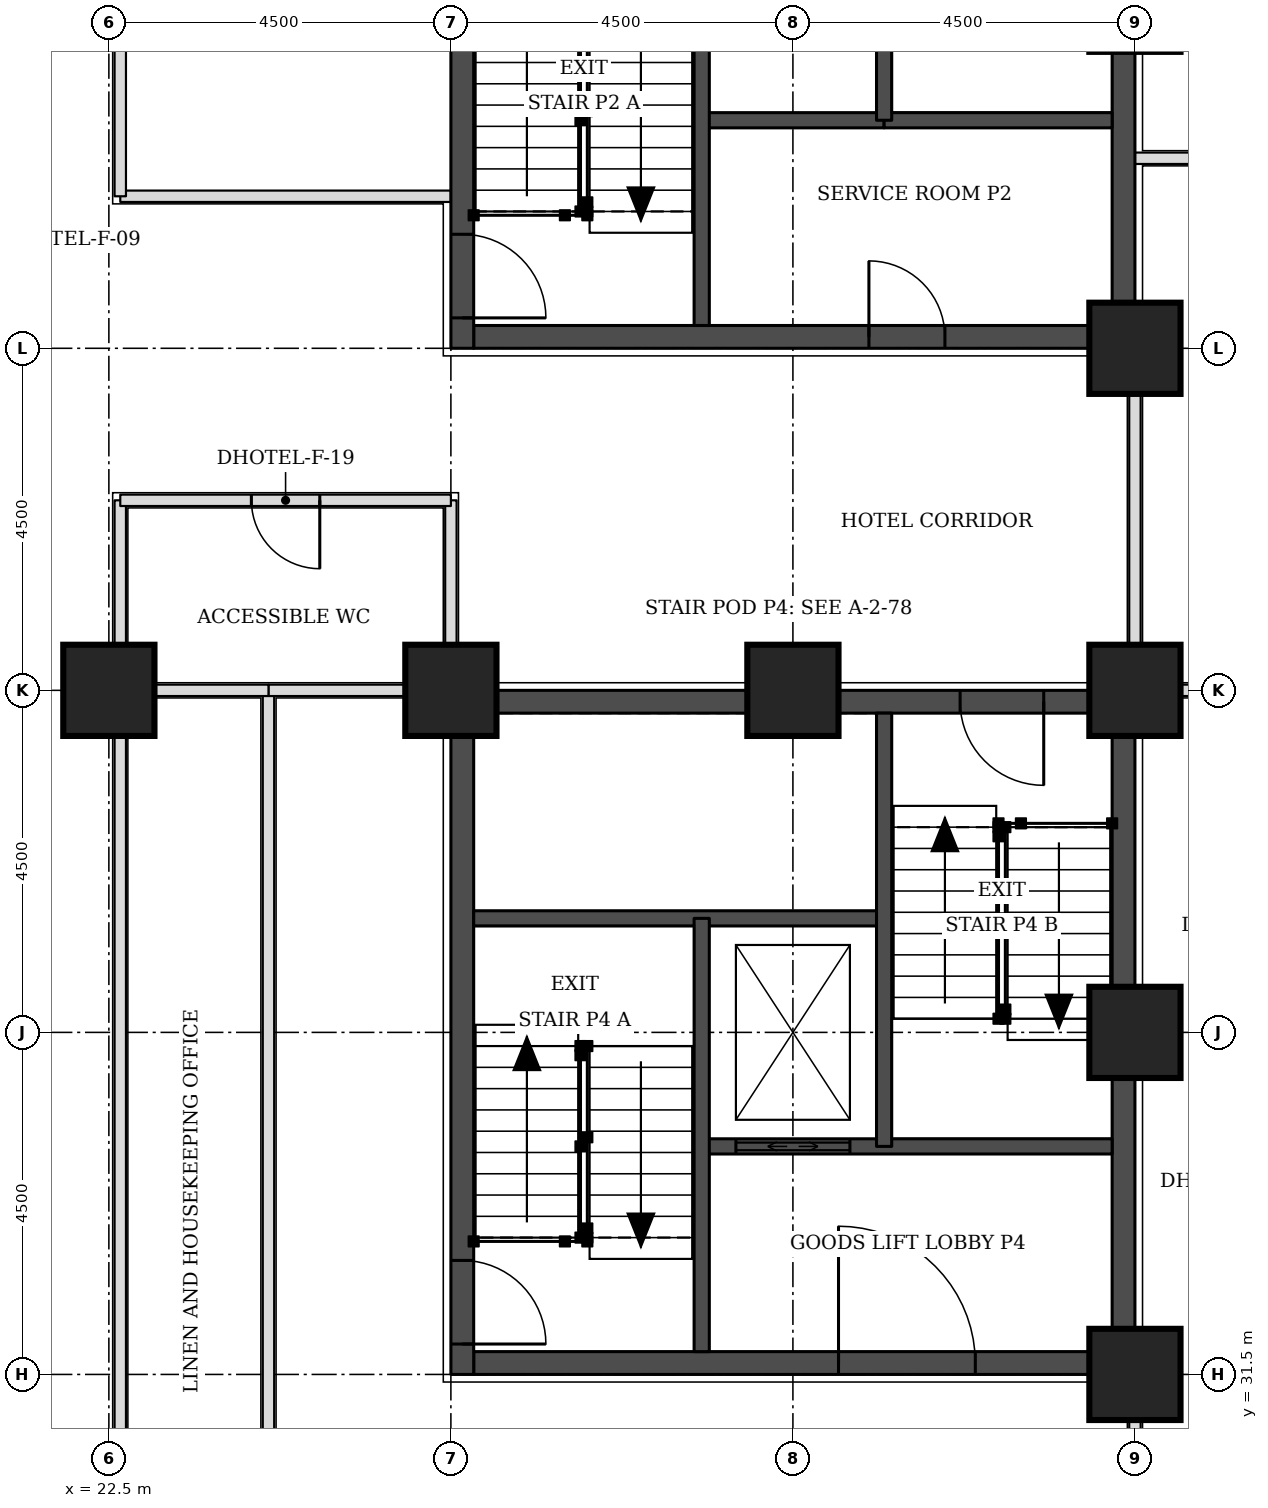
"""IFC4 building model, lengths in metres.
Left out: names, types, materials, properties, quantities, classifications, styles, units other than length and angle.
Written with IfcOpenShell. Run it as: python <this file> out.ifc"""

import sys

from ifc_helpers import new_model, si_unit, direction, frame, frame_2d, origin, origin_2d, place, context, subcontext, project, spatial, rectangle, extrude, element, fill, save


model = new_model("IFC4")
c1 = context("Model", 3, precision=1e-05, world=origin(), true_north=direction((0.0, 1.0)))
c2 = subcontext(c1, "Body", "Model", "MODEL_VIEW")
j1 = project(units=[si_unit("LENGTHUNIT", "METRE"), si_unit("PLANEANGLEUNIT", "RADIAN")], contexts=[c1])
p1 = place(None, origin())
s1 = spatial("IfcSite", under=j1, at=p1, CompositionType="ELEMENT")
p2 = place(p1, origin())
s2 = spatial("IfcBuilding", under=s1, at=p2, CompositionType="ELEMENT")
p3 = place(p2, frame((0.0, 0.0, 42.9)))
s3 = spatial("IfcBuildingStorey", under=s2, at=p3, CompositionType="ELEMENT", Elevation=42.9)
for number, where, z_axis, x_axis in (
    (1, (36.0, 31.5, 0.0), (0.0, 0.0, 1.0), (1.0, 0.0, 0.0)),
    (2, (36.0, 36.0, 0.0), (0.0, 0.0, 1.0), (1.0, 0.0, 0.0)),
    (3, (22.5, 40.5, 0.0), (0.0, 0.0, 1.0), (1.0, 0.0, 0.0)),
    (4, (27.0, 40.5, 0.0), (0.0, 0.0, 1.0), (1.0, 0.0, 0.0)),
    (5, (31.5, 40.5, 0.0), (0.0, 0.0, 1.0), (1.0, 0.0, 0.0)),
    (6, (36.0, 40.5, 0.0), (0.0, 0.0, 1.0), (1.0, 0.0, 0.0)),
    (7, (36.0, 45.0, 0.0), (0.0, 0.0, 1.0), (1.0, 0.0, 0.0)),
):
    element("IfcColumn", number, at=place(p3, frame(where, z_axis=z_axis, x_axis=x_axis)), inside=s3, PredefinedType="COLUMN", context=c2, shape_type="SweptSolid", body=[
        extrude(rectangle(XDim=1.2, YDim=1.2, at=origin_2d()), origin(), (0.0, 0.0, 1.0), 3.3),
    ])
p4 = place(p3, frame((27.3, 45.15, 0.0), z_axis=(0.0, 0.0, 1.0), x_axis=(1.0, 0.0, 0.0)))
e8 = element("IfcWall", 8, at=p4, inside=s3, PredefinedType="SHEAR", context=c2, shape_type="SweptSolid", body=[
    extrude(rectangle(XDim=8.4, YDim=0.3, at=frame_2d((4.2, 0.0))), origin(), (0.0, 0.0, 1.0), 3.3),
])
p5 = place(p4, frame((5.2, 0.0, 0.0)))
e9 = element("IfcOpeningElement", 9, at=p5, cuts=e8, PredefinedType="OPENING", context=c2, shape_type="SweptSolid", body=[
    extrude(rectangle(XDim=1.0, YDim=2.1, at=frame_2d((0.5, 1.05))), frame((0.0, 0.16, 0.0), z_axis=(0.0, -1.0, 0.0), x_axis=(1.0, 0.0, 0.0)), (0.0, 0.0, 1.0), 0.32),
])
p6 = place(p3, frame((27.15, 45.0, 0.0), z_axis=(0.0, 0.0, 1.0), x_axis=(0.0, 1.0, 0.0)))
e10 = element("IfcWall", 10, at=p6, inside=s3, PredefinedType="SHEAR", context=c2, shape_type="SweptSolid", body=[
    extrude(rectangle(XDim=9.0, YDim=0.3, at=frame_2d((4.5, 0.0))), origin(), (0.0, 0.0, 1.0), 3.3),
])
p7 = place(p6, frame((0.4, 0.0, 0.0)))
e11 = element("IfcOpeningElement", 11, at=p7, cuts=e10, PredefinedType="OPENING", context=c2, shape_type="SweptSolid", body=[
    extrude(rectangle(XDim=1.1, YDim=2.1, at=frame_2d((0.55, 1.05))), frame((0.0, 0.16, 0.0), z_axis=(0.0, -1.0, 0.0), x_axis=(1.0, 0.0, 0.0)), (0.0, 0.0, 1.0), 0.32),
])
p8 = place(p3, frame((35.85, 45.0, 0.0), z_axis=(0.0, 0.0, 1.0), x_axis=(0.0, 1.0, 0.0)))
e12 = element("IfcWall", 12, at=p8, inside=s3, PredefinedType="SHEAR", context=c2, shape_type="SweptSolid", body=[
    extrude(rectangle(XDim=9.0, YDim=0.3, at=frame_2d((4.5, 0.0))), origin(), (0.0, 0.0, 1.0), 3.3),
])
p9 = place(p3, frame((27.3, 31.65, 0.0), z_axis=(0.0, 0.0, 1.0), x_axis=(1.0, 0.0, 0.0)))
e13 = element("IfcWall", 13, at=p9, inside=s3, PredefinedType="SHEAR", context=c2, shape_type="SweptSolid", body=[
    extrude(rectangle(XDim=8.4, YDim=0.3, at=frame_2d((4.2, 0.0))), origin(), (0.0, 0.0, 1.0), 3.3),
])
p10 = place(p9, frame((4.8, 0.0, 0.0)))
e14 = element("IfcOpeningElement", 14, at=p10, cuts=e13, PredefinedType="OPENING", context=c2, shape_type="SweptSolid", body=[
    extrude(rectangle(XDim=1.8, YDim=2.1, at=frame_2d((0.9, 1.05))), frame((0.0, 0.16, 0.0), z_axis=(0.0, -1.0, 0.0), x_axis=(1.0, 0.0, 0.0)), (0.0, 0.0, 1.0), 0.32),
])
p11 = place(p3, frame((27.3, 40.35, 0.0), z_axis=(0.0, 0.0, 1.0), x_axis=(1.0, 0.0, 0.0)))
e15 = element("IfcWall", 15, at=p11, inside=s3, PredefinedType="SHEAR", context=c2, shape_type="SweptSolid", body=[
    extrude(rectangle(XDim=8.4, YDim=0.3, at=frame_2d((4.2, 0.0))), origin(), (0.0, 0.0, 1.0), 3.3),
])
p12 = place(p11, frame((6.4, 0.0, 0.0)))
e16 = element("IfcOpeningElement", 16, at=p12, cuts=e15, PredefinedType="OPENING", context=c2, shape_type="SweptSolid", body=[
    extrude(rectangle(XDim=1.1, YDim=2.1, at=frame_2d((0.55, 1.05))), frame((0.0, 0.16, 0.0), z_axis=(0.0, -1.0, 0.0), x_axis=(1.0, 0.0, 0.0)), (0.0, 0.0, 1.0), 0.32),
])
p13 = place(p3, frame((27.15, 31.5, 0.0), z_axis=(0.0, 0.0, 1.0), x_axis=(0.0, 1.0, 0.0)))
e17 = element("IfcWall", 17, at=p13, inside=s3, PredefinedType="SHEAR", context=c2, shape_type="SweptSolid", body=[
    extrude(rectangle(XDim=9.0, YDim=0.3, at=frame_2d((4.5, 0.0))), origin(), (0.0, 0.0, 1.0), 3.3),
])
p14 = place(p13, frame((0.4, 0.0, 0.0)))
e18 = element("IfcOpeningElement", 18, at=p14, cuts=e17, PredefinedType="OPENING", context=c2, shape_type="SweptSolid", body=[
    extrude(rectangle(XDim=1.1, YDim=2.1, at=frame_2d((0.55, 1.05))), frame((0.0, 0.16, 0.0), z_axis=(0.0, -1.0, 0.0), x_axis=(1.0, 0.0, 0.0)), (0.0, 0.0, 1.0), 0.32),
])
p15 = place(p3, frame((35.85, 31.5, 0.0), z_axis=(0.0, 0.0, 1.0), x_axis=(0.0, 1.0, 0.0)))
e19 = element("IfcWall", 19, at=p15, inside=s3, PredefinedType="SHEAR", context=c2, shape_type="SweptSolid", body=[
    extrude(rectangle(XDim=9.0, YDim=0.3, at=frame_2d((4.5, 0.0))), origin(), (0.0, 0.0, 1.0), 3.3),
])
p16 = place(p3, frame((22.65, 25.65, 0.0), z_axis=(0.0, 0.0, 1.0), x_axis=(0.0, 1.0, 0.0)))
e20 = element("IfcWall", 20, at=p16, inside=s3, PredefinedType="PARTITIONING", context=c2, shape_type="SweptSolid", body=[
    extrude(rectangle(XDim=17.35, YDim=0.15, at=frame_2d((8.675, 0.0))), origin(), (0.0, 0.0, 1.0), 3.08),
])
p17 = place(p16, frame((3.3, 0.0, 0.0)))
e21 = element("IfcOpeningElement", 21, at=p17, cuts=e20, PredefinedType="OPENING", context=c2, shape_type="SweptSolid", body=[
    extrude(rectangle(XDim=0.9, YDim=2.1, at=frame_2d((0.45, 1.05))), frame((0.0, 0.085, 0.0), z_axis=(0.0, -1.0, 0.0), x_axis=(1.0, 0.0, 0.0)), (0.0, 0.0, 1.0), 0.17),
])
p18 = place(p3, frame((24.6, 25.65, 0.0), z_axis=(0.0, 0.0, 1.0), x_axis=(0.0, 1.0, 0.0)))
e22 = element("IfcWall", 22, at=p18, inside=s3, PredefinedType="PARTITIONING", context=c2, shape_type="SweptSolid", body=[
    extrude(rectangle(XDim=14.85, YDim=0.15, at=frame_2d((7.425, 0.0))), origin(), (0.0, 0.0, 1.0), 3.08),
])
p19 = place(p3, frame((36.0, 29.5, 0.0), z_axis=(0.0, 0.0, 1.0), x_axis=(0.0, 1.0, 0.0)))
e23 = element("IfcWall", 23, at=p19, inside=s3, PredefinedType="PARTITIONING", context=c2, shape_type="SweptSolid", body=[
    extrude(rectangle(XDim=1.95, YDim=0.15, at=frame_2d((0.975, 0.0))), origin(), (0.0, 0.0, 1.0), 2.33),
])
p20 = place(p3, frame((24.6, 40.5, 0.0), z_axis=(0.0, 0.0, 1.0), x_axis=(1.0, 0.0, 0.0)))
e24 = element("IfcWall", 24, at=p20, inside=s3, PredefinedType="PARTITIONING", context=c2, shape_type="SweptSolid", body=[
    extrude(rectangle(XDim=2.35, YDim=0.15, at=frame_2d((1.175, 0.0))), origin(), (0.0, 0.0, 1.0), 2.33),
])
p21 = place(p3, frame((27.0, 40.55, 0.0), z_axis=(0.0, 0.0, 1.0), x_axis=(0.0, 1.0, 0.0)))
e25 = element("IfcWall", 25, at=p21, inside=s3, PredefinedType="PARTITIONING", context=c2, shape_type="SweptSolid", body=[
    extrude(rectangle(XDim=2.45, YDim=0.15, at=frame_2d((1.225, 0.0))), origin(), (0.0, 0.0, 1.0), 3.08),
])
p22 = place(p3, frame((36.0, 40.55, 0.0), z_axis=(0.0, 0.0, 1.0), x_axis=(0.0, 1.0, 0.0)))
e26 = element("IfcWall", 26, at=p22, inside=s3, PredefinedType="PARTITIONING", context=c2, shape_type="SweptSolid", body=[
    extrude(rectangle(XDim=4.4, YDim=0.15, at=frame_2d((2.2, 0.0))), origin(), (0.0, 0.0, 1.0), 2.33),
])
p23 = place(p3, frame((22.65, 43.0, 0.0), z_axis=(0.0, 0.0, 1.0), x_axis=(1.0, 0.0, 0.0)))
e27 = element("IfcWall", 27, at=p23, inside=s3, PredefinedType="PARTITIONING", context=c2, shape_type="SweptSolid", body=[
    extrude(rectangle(XDim=4.35, YDim=0.15, at=frame_2d((2.175, 0.0))), origin(), (0.0, 0.0, 1.0), 3.08),
])
p24 = place(p23, frame((1.725, 0.0, 0.0)))
e28 = element("IfcOpeningElement", 28, at=p24, cuts=e27, PredefinedType="OPENING", context=c2, shape_type="SweptSolid", body=[
    extrude(rectangle(XDim=0.9, YDim=2.1, at=frame_2d((0.45, 1.05))), frame((0.0, 0.085, 0.0), z_axis=(0.0, -1.0, 0.0), x_axis=(1.0, 0.0, 0.0)), (0.0, 0.0, 1.0), 0.17),
])
p25 = place(p3, frame((22.65, 47.0, 0.0), z_axis=(0.0, 0.0, 1.0), x_axis=(1.0, 0.0, 0.0)))
e29 = element("IfcWall", 29, at=p25, inside=s3, PredefinedType="PARTITIONING", context=c2, shape_type="SweptSolid", body=[
    extrude(rectangle(XDim=4.35, YDim=0.15, at=frame_2d((2.175, 0.0))), origin(), (0.0, 0.0, 1.0), 3.08),
])
p26 = place(p3, frame((22.65, 47.0, 0.0), z_axis=(0.0, 0.0, 1.0), x_axis=(0.0, 1.0, 0.0)))
e30 = element("IfcWall", 30, at=p26, inside=s3, PredefinedType="PARTITIONING", context=c2, shape_type="SweptSolid", body=[
    extrude(rectangle(XDim=2.5, YDim=0.15, at=frame_2d((1.25, 0.0))), origin(), (0.0, 0.0, 1.0), 3.08),
])
p27 = place(p3, frame((22.65, 40.5, 0.0), z_axis=(0.0, 0.0, 1.0), x_axis=(1.0, 0.0, 0.0)))
e31 = element("IfcWall", 31, at=p27, inside=s3, PredefinedType="PARTITIONING", context=c2, shape_type="SweptSolid", body=[
    extrude(rectangle(XDim=1.95, YDim=0.15, at=frame_2d((0.975, 0.0))), origin(), (0.0, 0.0, 1.0), 2.33),
])
p28 = place(p3, frame((36.05, 40.5, 0.0), z_axis=(0.0, 0.0, 1.0), x_axis=(1.0, 0.0, 0.0)))
e32 = element("IfcWall", 32, at=p28, inside=s3, PredefinedType="PARTITIONING", context=c2, shape_type="SweptSolid", body=[
    extrude(rectangle(XDim=2.45, YDim=0.15, at=frame_2d((1.225, 0.0))), origin(), (0.0, 0.0, 1.0), 2.33),
])
p29 = place(p3, frame((36.0, 47.5, 0.0), z_axis=(0.0, 0.0, 1.0), x_axis=(1.0, 0.0, 0.0)))
e33 = element("IfcWall", 33, at=p29, inside=s3, PredefinedType="PARTITIONING", context=c2, shape_type="SweptSolid", body=[
    extrude(rectangle(XDim=7.0, YDim=0.15, at=frame_2d((3.5, 0.0))), origin(), (0.0, 0.0, 1.0), 3.08),
])
p30 = place(p3, frame((30.3, 48.0, 0.0), z_axis=(0.0, 0.0, 1.0), x_axis=(1.0, 0.0, 0.0)))
e34 = element("IfcWall", 34, at=p30, inside=s3, PredefinedType="SOLIDWALL", context=c2, shape_type="SweptSolid", body=[
    extrude(rectangle(XDim=2.4, YDim=0.2, at=frame_2d((1.2, 0.0))), origin(), (0.0, 0.0, 1.0), 3.08),
])
p31 = place(p3, frame((32.7, 48.0, 0.0), z_axis=(0.0, 0.0, 1.0), x_axis=(1.0, 0.0, 0.0)))
e35 = element("IfcWall", 35, at=p31, inside=s3, PredefinedType="SOLIDWALL", context=c2, shape_type="SweptSolid", body=[
    extrude(rectangle(XDim=3.0, YDim=0.2, at=frame_2d((1.5, 0.0))), origin(), (0.0, 0.0, 1.0), 3.08),
])
for number, where, z_axis, x_axis in (
    (36, (30.3, 45.3, 0.0), (0.0, 0.0, 1.0), (0.0, 1.0, 0.0)),
    (37, (32.7, 48.0, 0.0), (0.0, 0.0, 1.0), (0.0, 1.0, 0.0)),
):
    element("IfcWall", number, at=place(p3, frame(where, z_axis=z_axis, x_axis=x_axis)), inside=s3, PredefinedType="SOLIDWALL", context=c2, shape_type="SweptSolid", body=[
        extrude(rectangle(XDim=5.7, YDim=0.2, at=frame_2d((2.85, 0.0))), origin(), (0.0, 0.0, 1.0), 3.08),
    ])
p32 = place(p3, frame((30.3, 34.5, 0.0), z_axis=(0.0, 0.0, 1.0), x_axis=(1.0, 0.0, 0.0)))
e38 = element("IfcWall", 38, at=p32, inside=s3, PredefinedType="SOLIDWALL", context=c2, shape_type="SweptSolid", body=[
    extrude(rectangle(XDim=5.4, YDim=0.2, at=frame_2d((2.7, 0.0))), origin(), (0.0, 0.0, 1.0), 3.08),
])
p33 = place(p32, frame((0.45, 0.0, 0.0)))
e39 = element("IfcOpeningElement", 39, at=p33, cuts=e38, PredefinedType="OPENING", context=c2, shape_type="SweptSolid", body=[
    extrude(rectangle(XDim=1.5, YDim=2.1, at=frame_2d((0.75, 1.05))), frame((0.0, 0.11, 0.0), z_axis=(0.0, -1.0, 0.0), x_axis=(1.0, 0.0, 0.0)), (0.0, 0.0, 1.0), 0.22),
])
p34 = place(p3, frame((27.3, 37.5, 0.0), z_axis=(0.0, 0.0, 1.0), x_axis=(1.0, 0.0, 0.0)))
e40 = element("IfcWall", 40, at=p34, inside=s3, PredefinedType="SOLIDWALL", context=c2, shape_type="SweptSolid", body=[
    extrude(rectangle(XDim=5.4, YDim=0.2, at=frame_2d((2.7, 0.0))), origin(), (0.0, 0.0, 1.0), 3.08),
])
for number, where, z_axis, x_axis in (
    (41, (30.3, 31.8, 0.0), (0.0, 0.0, 1.0), (0.0, 1.0, 0.0)),
    (42, (32.7, 34.5, 0.0), (0.0, 0.0, 1.0), (0.0, 1.0, 0.0)),
):
    element("IfcWall", number, at=place(p3, frame(where, z_axis=z_axis, x_axis=x_axis)), inside=s3, PredefinedType="SOLIDWALL", context=c2, shape_type="SweptSolid", body=[
        extrude(rectangle(XDim=5.7, YDim=0.2, at=frame_2d((2.85, 0.0))), origin(), (0.0, 0.0, 1.0), 3.08),
    ])
p35 = place(p24, frame((0.9, 0.0, 0.0), z_axis=(0.0, 0.0, 1.0), x_axis=(-1.0, 0.0, 0.0)))
e43 = element("IfcDoor", 43, at=p35, inside=s3, OperationType="SINGLE_SWING_LEFT", PredefinedType="DOOR", context=c2, shape_type="SweptSolid", body=[
    extrude(rectangle(XDim=0.9, YDim=2.1, at=frame_2d((0.45, 1.05))), frame((0.0, 0.025, 0.0), z_axis=(0.0, -1.0, 0.0), x_axis=(1.0, 0.0, 0.0)), (0.0, 0.0, 1.0), 0.05),
])
fill(e28, e43)
p36 = place(p7, frame((1.1, 0.0, 0.0), z_axis=(0.0, 0.0, 1.0), x_axis=(-1.0, 0.0, 0.0)))
e44 = element("IfcDoor", 44, at=p36, inside=s3, OperationType="SINGLE_SWING_RIGHT", PredefinedType="DOOR", context=c2, shape_type="SweptSolid", body=[
    extrude(rectangle(XDim=1.1, YDim=2.1, at=frame_2d((0.55, 1.05))), frame((0.0, 0.025, 0.0), z_axis=(0.0, -1.0, 0.0), x_axis=(1.0, 0.0, 0.0)), (0.0, 0.0, 1.0), 0.05),
])
fill(e11, e44)
p37 = place(p5, origin())
e45 = element("IfcDoor", 45, at=p37, inside=s3, OperationType="SINGLE_SWING_LEFT", PredefinedType="DOOR", context=c2, shape_type="SweptSolid", body=[
    extrude(rectangle(XDim=1.0, YDim=2.1, at=frame_2d((0.5, 1.05))), frame((0.0, 0.025, 0.0), z_axis=(0.0, -1.0, 0.0), x_axis=(1.0, 0.0, 0.0)), (0.0, 0.0, 1.0), 0.05),
])
fill(e9, e45)
p38 = place(p14, frame((1.1, 0.0, 0.0), z_axis=(0.0, 0.0, 1.0), x_axis=(-1.0, 0.0, 0.0)))
e46 = element("IfcDoor", 46, at=p38, inside=s3, OperationType="SINGLE_SWING_RIGHT", PredefinedType="DOOR", context=c2, shape_type="SweptSolid", body=[
    extrude(rectangle(XDim=1.1, YDim=2.1, at=frame_2d((0.55, 1.05))), frame((0.0, 0.025, 0.0), z_axis=(0.0, -1.0, 0.0), x_axis=(1.0, 0.0, 0.0)), (0.0, 0.0, 1.0), 0.05),
])
fill(e18, e46)
p39 = place(p12, frame((1.1, 0.0, 0.0), z_axis=(0.0, 0.0, 1.0), x_axis=(-1.0, 0.0, 0.0)))
e47 = element("IfcDoor", 47, at=p39, inside=s3, OperationType="SINGLE_SWING_LEFT", PredefinedType="DOOR", context=c2, shape_type="SweptSolid", body=[
    extrude(rectangle(XDim=1.1, YDim=2.1, at=frame_2d((0.55, 1.05))), frame((0.0, 0.025, 0.0), z_axis=(0.0, -1.0, 0.0), x_axis=(1.0, 0.0, 0.0)), (0.0, 0.0, 1.0), 0.05),
])
fill(e16, e47)
p40 = place(p33, origin())
e48 = element("IfcDoor", 48, at=p40, inside=s3, OperationType="DOUBLE_DOOR_SLIDING", PredefinedType="DOOR", context=c2, shape_type="SweptSolid", body=[
    extrude(rectangle(XDim=1.5, YDim=2.1, at=frame_2d((0.75, 1.05))), frame((0.0, 0.025, 0.0), z_axis=(0.0, -1.0, 0.0), x_axis=(1.0, 0.0, 0.0)), (0.0, 0.0, 1.0), 0.05),
])
fill(e39, e48)
p41 = place(p10, origin())
e49 = element("IfcDoor", 49, at=p41, inside=s3, OperationType="SINGLE_SWING_LEFT", PredefinedType="DOOR", context=c2, shape_type="SweptSolid", body=[
    extrude(rectangle(XDim=1.8, YDim=2.1, at=frame_2d((0.9, 1.05))), frame((0.0, 0.025, 0.0), z_axis=(0.0, -1.0, 0.0), x_axis=(1.0, 0.0, 0.0)), (0.0, 0.0, 1.0), 0.05),
])
fill(e14, e49)
save(model, sys.argv[1])
